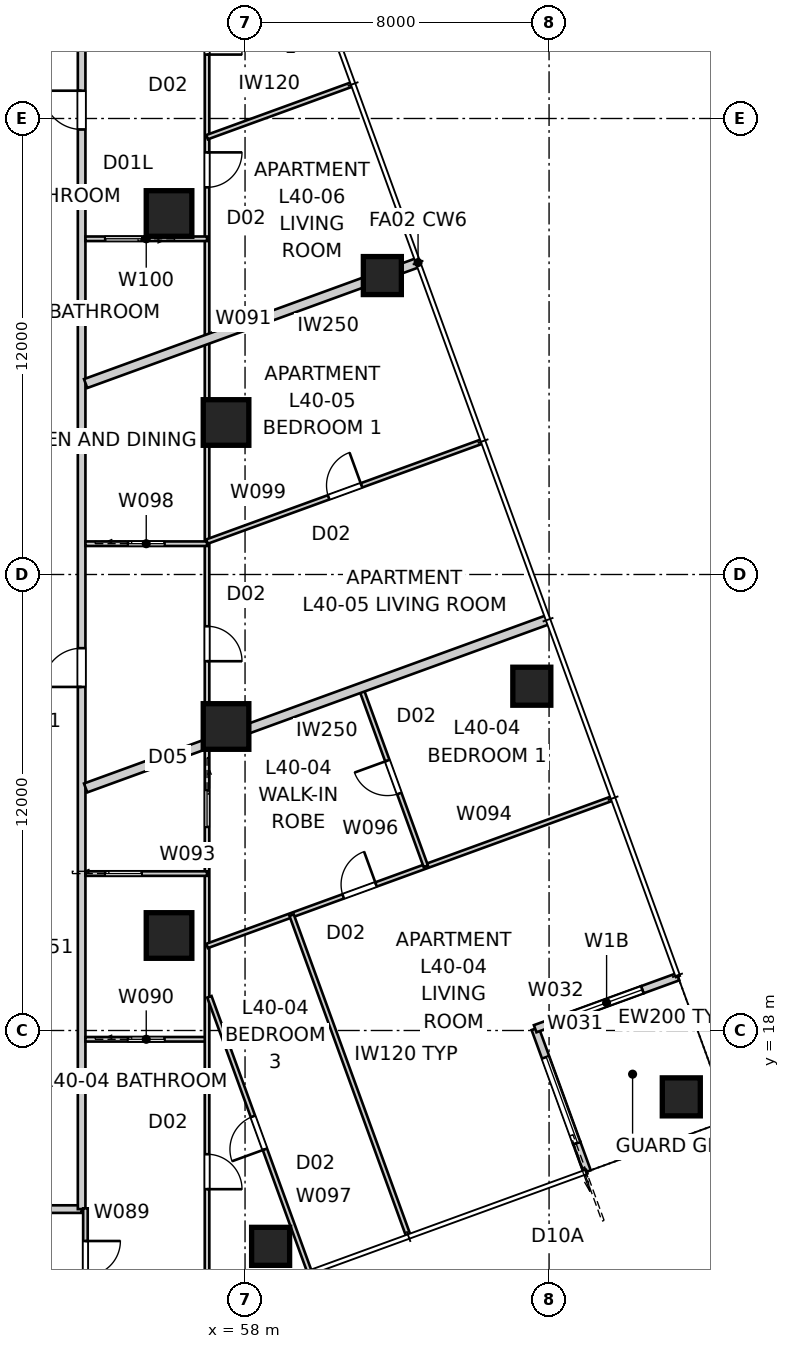
"""IFC4 building model, lengths in metres.
Left out: names, types, materials, properties, quantities, classifications, styles, units other than length and angle.
Written with IfcOpenShell. Run it as: python <this file> out.ifc"""

import sys

from ifc_helpers import new_model, si_unit, direction, frame, frame_2d, origin, origin_2d, place, context, subcontext, project, spatial, rectangle, extrude, element, fill, save


model = new_model("IFC4")
c1 = context("Model", 3, precision=1e-05, world=origin(), true_north=direction((0.0, 1.0)))
c2 = subcontext(c1, "Body", "Model", "MODEL_VIEW")
j1 = project(units=[si_unit("LENGTHUNIT", "METRE"), si_unit("PLANEANGLEUNIT", "RADIAN")], contexts=[c1])
p1 = place(None, origin())
s1 = spatial("IfcSite", under=j1, at=p1, CompositionType="ELEMENT")
p2 = place(p1, origin())
s2 = spatial("IfcBuilding", under=s1, at=p2, CompositionType="ELEMENT")
p3 = place(p2, frame((0.0, 0.0, 147.2)))
s3 = spatial("IfcBuildingStorey", under=s2, at=p3, CompositionType="ELEMENT", Elevation=147.2)
for number, where, z_axis, x_axis in (
    (1, (58.673, 12.32, 0.0), (0.0, 0.0, 1.0), (1.0, 0.0, 0.0)),
    (2, (69.479, 16.253, 0.0), (0.0, 0.0, 1.0), (1.0, 0.0, 0.0)),
    (3, (65.546, 27.06, 0.0), (0.0, 0.0, 1.0), (1.0, 0.0, 0.0)),
    (4, (61.613, 37.866, 0.0), (0.0, 0.0, 1.0), (1.0, 0.0, 0.0)),
):
    element("IfcColumn", number, at=place(p3, frame(where, z_axis=z_axis, x_axis=x_axis)), inside=s3, PredefinedType="COLUMN", context=c2, shape_type="SweptSolid", body=[
        extrude(rectangle(XDim=1.0, YDim=1.0, at=origin_2d()), origin(), (0.0, 0.0, 1.0), 3.4),
    ])
for number, where, z_axis, x_axis in (
    (5, (57.5, 26.0, 0.0), (0.0, 0.0, 1.0), (1.0, 0.0, 0.0)),
    (6, (57.5, 34.0, 0.0), (0.0, 0.0, 1.0), (1.0, 0.0, 0.0)),
    (7, (56.0, 39.5, 0.0), (0.0, 0.0, 1.0), (1.0, 0.0, 0.0)),
    (8, (56.0, 20.5, 0.0), (0.0, 0.0, 1.0), (1.0, 0.0, 0.0)),
):
    element("IfcColumn", number, at=place(p3, frame(where, z_axis=z_axis, x_axis=x_axis)), inside=s3, PredefinedType="COLUMN", context=c2, shape_type="SweptSolid", body=[
        extrude(rectangle(XDim=1.2, YDim=1.2, at=origin_2d()), origin(), (0.0, 0.0, 1.0), 3.4),
    ])
p4 = place(p3, frame((67.002, 14.288, 0.0), z_axis=(0.0, 0.0, 1.0), x_axis=(-0.342110593602, 0.939659694648, 0.0)))
e9 = element("IfcWall", 9, at=p4, inside=s3, PredefinedType="SOLIDWALL", context=c2, shape_type="SweptSolid", body=[
    extrude(rectangle(XDim=0.8, YDim=0.2, at=frame_2d((0.4, 0.0))), origin(), (0.0, 0.0, 1.0), 3.25),
])
p5 = place(p3, frame((66.729, 15.04, 0.0), z_axis=(0.0, 0.0, 1.0), x_axis=(-0.342018703306, 0.939693144909, 0.0)))
e10 = element("IfcWall", 10, at=p5, inside=s3, PredefinedType="SOLIDWALL", context=c2, shape_type="SweptSolid", body=[
    extrude(rectangle(XDim=3.2, YDim=0.2, at=frame_2d((1.6, 0.0))), origin(), (0.0, 0.0, 1.0), 2.722),
])
p6 = place(p5, origin())
e11 = element("IfcOpeningElement", 11, at=p6, cuts=e10, PredefinedType="OPENING", context=c2, shape_type="SweptSolid", body=[
    extrude(rectangle(XDim=2.4, YDim=2.1, at=frame_2d((1.2, 1.05))), frame((0.0, 0.11, 0.0), z_axis=(0.0, -1.0, 0.0), x_axis=(1.0, 0.0, 0.0)), (0.0, 0.0, 1.0), 0.22),
])
p7 = place(p3, frame((65.634, 18.047, 0.0), z_axis=(0.0, 0.0, 1.0), x_axis=(0.939712609717, 0.341965219194, 0.0)))
e12 = element("IfcWall", 12, at=p7, inside=s3, PredefinedType="SOLIDWALL", context=c2, shape_type="SweptSolid", body=[
    extrude(rectangle(XDim=3.0, YDim=0.2, at=frame_2d((1.5, 0.0))), origin(), (0.0, 0.0, 1.0), 2.722),
])
p8 = place(p7, frame((1.0, 0.0, 0.45)))
e13 = element("IfcOpeningElement", 13, at=p8, cuts=e12, PredefinedType="OPENING", context=c2, shape_type="SweptSolid", body=[
    extrude(rectangle(XDim=2.0, YDim=1.8, at=frame_2d((1.0, 0.9))), frame((0.0, 0.11, 0.0), z_axis=(0.0, -1.0, 0.0), x_axis=(1.0, 0.0, 0.0)), (0.0, 0.0, 1.0), 0.22),
])
p9 = place(p3, frame((68.453, 19.073, 0.0), z_axis=(0.0, 0.0, 1.0), x_axis=(0.939686455819, 0.342037080957, 0.0)))
e14 = element("IfcWall", 14, at=p9, inside=s3, PredefinedType="SOLIDWALL", context=c2, shape_type="SweptSolid", body=[
    extrude(rectangle(XDim=1.0, YDim=0.2, at=frame_2d((0.5, 0.0))), origin(), (0.0, 0.0, 1.0), 3.25),
])
p10 = place(p3, frame((47.775, 13.3, 0.0), z_axis=(0.0, 0.0, 1.0), x_axis=(1.0, 0.0, 0.0)))
e15 = element("IfcWall", 15, at=p10, inside=s3, PredefinedType="PARTITIONING", context=c2, shape_type="SweptSolid", body=[
    extrude(rectangle(XDim=5.925, YDim=0.2, at=frame_2d((2.962, 0.0))), origin(), (0.0, 0.0, 1.0), 3.25),
])
p11 = place(p10, frame((2.453, 0.0, 0.0)))
e16 = element("IfcOpeningElement", 16, at=p11, cuts=e15, PredefinedType="OPENING", context=c2, shape_type="SweptSolid", body=[
    extrude(rectangle(XDim=1.02, YDim=2.34, at=frame_2d((0.51, 1.17))), frame((0.0, 0.11, 0.0), z_axis=(0.0, -1.0, 0.0), x_axis=(1.0, 0.0, 0.0)), (0.0, 0.0, 1.0), 0.22),
])
p12 = place(p3, frame((53.7, 13.3, 0.0), z_axis=(0.0, 0.0, 1.0), x_axis=(0.0, 1.0, 0.0)))
e17 = element("IfcWall", 17, at=p12, inside=s3, PredefinedType="PARTITIONING", context=c2, shape_type="SweptSolid", body=[
    extrude(rectangle(XDim=33.0, YDim=0.2, at=frame_2d((16.5, 0.0))), origin(), (0.0, 0.0, 1.0), 3.25),
])
p13 = place(p12, frame((28.411, 0.0, 0.0)))
e18 = element("IfcOpeningElement", 18, at=p13, cuts=e17, PredefinedType="OPENING", context=c2, shape_type="SweptSolid", body=[
    extrude(rectangle(XDim=1.02, YDim=2.1, at=frame_2d((0.51, 1.05))), frame((0.0, 0.11, 0.0), z_axis=(0.0, -1.0, 0.0), x_axis=(1.0, 0.0, 0.0)), (0.0, 0.0, 1.0), 0.22),
])
p14 = place(p12, frame((13.741, 0.0, 0.0)))
e19 = element("IfcOpeningElement", 19, at=p14, cuts=e17, PredefinedType="OPENING", context=c2, shape_type="SweptSolid", body=[
    extrude(rectangle(XDim=1.02, YDim=2.34, at=frame_2d((0.51, 1.17))), frame((0.0, 0.11, 0.0), z_axis=(0.0, -1.0, 0.0), x_axis=(1.0, 0.0, 0.0)), (0.0, 0.0, 1.0), 0.22),
])
p15 = place(p3, frame((62.553, 38.208, 0.0), z_axis=(0.0, 0.0, 1.0), x_axis=(-0.939693071685, -0.342018904489, 0.0)))
e20 = element("IfcWall", 20, at=p15, inside=s3, PredefinedType="PARTITIONING", context=c2, shape_type="SweptSolid", body=[
    extrude(rectangle(XDim=9.309, YDim=0.25, at=frame_2d((4.654, 0.0))), origin(), (0.0, 0.0, 1.0), 3.25),
])
p16 = place(p3, frame((65.973, 28.812, 0.0), z_axis=(0.0, 0.0, 1.0), x_axis=(-0.939692090592, -0.342021600019, 0.0)))
e21 = element("IfcWall", 21, at=p16, inside=s3, PredefinedType="PARTITIONING", context=c2, shape_type="SweptSolid", body=[
    extrude(rectangle(XDim=12.949, YDim=0.25, at=frame_2d((6.474, 0.0))), origin(), (0.0, 0.0, 1.0), 3.25),
])
p17 = place(p3, frame((53.8, 13.32, 0.0), z_axis=(0.0, 0.0, 1.0), x_axis=(0.0, -1.0, 0.0)))
e22 = element("IfcWall", 22, at=p17, inside=s3, PredefinedType="PARTITIONING", context=c2, shape_type="SweptSolid", body=[
    extrude(rectangle(XDim=2.52, YDim=0.12, at=frame_2d((1.26, 0.0))), origin(), (0.0, 0.0, 1.0), 3.25),
])
p18 = place(p17, frame((0.86, 0.0, 0.0)))
e23 = element("IfcOpeningElement", 23, at=p18, cuts=e22, PredefinedType="OPENING", context=c2, shape_type="SweptSolid", body=[
    extrude(rectangle(XDim=0.92, YDim=2.34, at=frame_2d((0.46, 1.17))), frame((0.0, 0.07, 0.0), z_axis=(0.0, -1.0, 0.0), x_axis=(1.0, 0.0, 0.0)), (0.0, 0.0, 1.0), 0.14),
])
p19 = place(p3, frame((53.8, 17.769, 0.0), z_axis=(0.0, 0.0, 1.0), x_axis=(1.0, 0.0, 0.0)))
e24 = element("IfcWall", 24, at=p19, inside=s3, PredefinedType="PARTITIONING", context=c2, shape_type="SweptSolid", body=[
    extrude(rectangle(XDim=3.2, YDim=0.12, at=frame_2d((1.6, 0.0))), origin(), (0.0, 0.0, 1.0), 3.25),
])
p20 = place(p19, frame((1.12, 0.0, 0.0)))
e25 = element("IfcOpeningElement", 25, at=p20, cuts=e24, PredefinedType="OPENING", context=c2, shape_type="SweptSolid", body=[
    extrude(rectangle(XDim=0.96, YDim=2.1, at=frame_2d((0.48, 1.05))), frame((0.0, 0.07, 0.0), z_axis=(0.0, -1.0, 0.0), x_axis=(1.0, 0.0, 0.0)), (0.0, 0.0, 1.0), 0.14),
])
p21 = place(p3, frame((57.0, 48.8, 0.0), z_axis=(0.0, 0.0, 1.0), x_axis=(0.0, -1.0, 0.0)))
e26 = element("IfcWall", 26, at=p21, inside=s3, PredefinedType="PARTITIONING", context=c2, shape_type="SweptSolid", body=[
    extrude(rectangle(XDim=38.113, YDim=0.12, at=frame_2d((19.056, 0.0))), origin(), (0.0, 0.0, 1.0), 2.55),
])
p22 = place(p21, frame((4.198, 0.0, 0.0)))
e27 = element("IfcOpeningElement", 27, at=p22, cuts=e26, PredefinedType="OPENING", context=c2, shape_type="SweptSolid", body=[
    extrude(rectangle(XDim=0.92, YDim=2.34, at=frame_2d((0.46, 1.17))), frame((0.0, 0.07, 0.0), z_axis=(0.0, -1.0, 0.0), x_axis=(1.0, 0.0, 0.0)), (0.0, 0.0, 1.0), 0.14),
])
p23 = place(p21, frame((7.692, 0.0, 0.0)))
e28 = element("IfcOpeningElement", 28, at=p23, cuts=e26, PredefinedType="OPENING", context=c2, shape_type="SweptSolid", body=[
    extrude(rectangle(XDim=0.92, YDim=2.34, at=frame_2d((0.46, 1.17))), frame((0.0, 0.07, 0.0), z_axis=(0.0, -1.0, 0.0), x_axis=(1.0, 0.0, 0.0)), (0.0, 0.0, 1.0), 0.14),
])
p24 = place(p21, frame((20.162, 0.0, 0.0)))
e29 = element("IfcOpeningElement", 29, at=p24, cuts=e26, PredefinedType="OPENING", context=c2, shape_type="SweptSolid", body=[
    extrude(rectangle(XDim=0.92, YDim=2.34, at=frame_2d((0.46, 1.17))), frame((0.0, 0.07, 0.0), z_axis=(0.0, -1.0, 0.0), x_axis=(1.0, 0.0, 0.0)), (0.0, 0.0, 1.0), 0.14),
])
p25 = place(p21, frame((34.056, 0.0, 0.0)))
e30 = element("IfcOpeningElement", 30, at=p25, cuts=e26, PredefinedType="OPENING", context=c2, shape_type="SweptSolid", body=[
    extrude(rectangle(XDim=0.92, YDim=2.34, at=frame_2d((0.46, 1.17))), frame((0.0, 0.07, 0.0), z_axis=(0.0, -1.0, 0.0), x_axis=(1.0, 0.0, 0.0)), (0.0, 0.0, 1.0), 0.14),
])
p26 = place(p21, frame((24.482, 0.0, 0.0)))
e31 = element("IfcOpeningElement", 31, at=p26, cuts=e26, PredefinedType="OPENING", context=c2, shape_type="SweptSolid", body=[
    extrude(rectangle(XDim=0.96, YDim=2.1, at=frame_2d((0.48, 1.05))), frame((0.0, 0.07, 0.0), z_axis=(0.0, -1.0, 0.0), x_axis=(1.0, 0.0, 0.0)), (0.0, 0.0, 1.0), 0.14),
])
p27 = place(p3, frame((53.8, 22.129, 0.0), z_axis=(0.0, 0.0, 1.0), x_axis=(1.0, 0.0, 0.0)))
e32 = element("IfcWall", 32, at=p27, inside=s3, PredefinedType="PARTITIONING", context=c2, shape_type="SweptSolid", body=[
    extrude(rectangle(XDim=3.2, YDim=0.12, at=frame_2d((1.6, 0.0))), origin(), (0.0, 0.0, 1.0), 3.25),
])
p28 = place(p27, frame((0.52, 0.0, 0.0)))
e33 = element("IfcOpeningElement", 33, at=p28, cuts=e32, PredefinedType="OPENING", context=c2, shape_type="SweptSolid", body=[
    extrude(rectangle(XDim=0.96, YDim=2.1, at=frame_2d((0.48, 1.05))), frame((0.0, 0.07, 0.0), z_axis=(0.0, -1.0, 0.0), x_axis=(1.0, 0.0, 0.0)), (0.0, 0.0, 1.0), 0.14),
])
p29 = place(p3, frame((57.0, 20.225, 0.0), z_axis=(0.0, 0.0, 1.0), x_axis=(0.939693965364, 0.342016449105, 0.0)))
e34 = element("IfcWall", 34, at=p29, inside=s3, PredefinedType="PARTITIONING", context=c2, shape_type="SweptSolid", body=[
    extrude(rectangle(XDim=11.328, YDim=0.12, at=frame_2d((5.664, 0.0))), origin(), (0.0, 0.0, 1.0), 3.25),
])
p30 = place(p29, frame((3.812, 0.0, 0.0)))
e35 = element("IfcOpeningElement", 35, at=p30, cuts=e34, PredefinedType="OPENING", context=c2, shape_type="SweptSolid", body=[
    extrude(rectangle(XDim=0.92, YDim=2.34, at=frame_2d((0.46, 1.17))), frame((0.0, 0.07, 0.0), z_axis=(0.0, -1.0, 0.0), x_axis=(1.0, 0.0, 0.0)), (0.0, 0.0, 1.0), 0.14),
])
p31 = place(p3, frame((62.29, 12.615, 0.0), z_axis=(0.0, 0.0, 1.0), x_axis=(-0.342038393654, 0.939685978009, 0.0)))
e36 = element("IfcWall", 36, at=p31, inside=s3, PredefinedType="PARTITIONING", context=c2, shape_type="SweptSolid", body=[
    extrude(rectangle(XDim=8.96, YDim=0.12, at=frame_2d((4.48, 0.0))), origin(), (0.0, 0.0, 1.0), 3.25),
])
p32 = place(p3, frame((62.757, 22.32, 0.0), z_axis=(0.0, 0.0, 1.0), x_axis=(-0.341993964619, 0.939702148643, 0.0)))
e37 = element("IfcWall", 37, at=p32, inside=s3, PredefinedType="PARTITIONING", context=c2, shape_type="SweptSolid", body=[
    extrude(rectangle(XDim=5.0, YDim=0.12, at=frame_2d((2.5, 0.0))), origin(), (0.0, 0.0, 1.0), 3.25),
])
p33 = place(p32, frame((2.04, 0.0, 0.0)))
e38 = element("IfcOpeningElement", 38, at=p33, cuts=e37, PredefinedType="OPENING", context=c2, shape_type="SweptSolid", body=[
    extrude(rectangle(XDim=0.92, YDim=2.34, at=frame_2d((0.46, 1.17))), frame((0.0, 0.07, 0.0), z_axis=(0.0, -1.0, 0.0), x_axis=(1.0, 0.0, 0.0)), (0.0, 0.0, 1.0), 0.14),
])
p34 = place(p3, frame((59.689, 11.669, 0.0), z_axis=(0.0, 0.0, 1.0), x_axis=(-0.342003311293, 0.939698746974, 0.0)))
e39 = element("IfcWall", 39, at=p34, inside=s3, PredefinedType="PARTITIONING", context=c2, shape_type="SweptSolid", body=[
    extrude(rectangle(XDim=7.683, YDim=0.12, at=frame_2d((3.841, 0.0))), origin(), (0.0, 0.0, 1.0), 3.25),
])
p35 = place(p34, frame((3.411, 0.0, 0.0)))
e40 = element("IfcOpeningElement", 40, at=p35, cuts=e39, PredefinedType="OPENING", context=c2, shape_type="SweptSolid", body=[
    extrude(rectangle(XDim=0.92, YDim=2.34, at=frame_2d((0.46, 1.17))), frame((0.0, 0.07, 0.0), z_axis=(0.0, -1.0, 0.0), x_axis=(1.0, 0.0, 0.0)), (0.0, 0.0, 1.0), 0.14),
])
p36 = place(p3, frame((53.8, 30.81, 0.0), z_axis=(0.0, 0.0, 1.0), x_axis=(1.0, 0.0, 0.0)))
e41 = element("IfcWall", 41, at=p36, inside=s3, PredefinedType="PARTITIONING", context=c2, shape_type="SweptSolid", body=[
    extrude(rectangle(XDim=3.2, YDim=0.12, at=frame_2d((1.6, 0.0))), origin(), (0.0, 0.0, 1.0), 3.25),
])
p37 = place(p36, frame((1.12, 0.0, 0.0)))
e42 = element("IfcOpeningElement", 42, at=p37, cuts=e41, PredefinedType="OPENING", context=c2, shape_type="SweptSolid", body=[
    extrude(rectangle(XDim=0.96, YDim=2.1, at=frame_2d((0.48, 1.05))), frame((0.0, 0.07, 0.0), z_axis=(0.0, -1.0, 0.0), x_axis=(1.0, 0.0, 0.0)), (0.0, 0.0, 1.0), 0.14),
])
p38 = place(p3, frame((57.0, 30.866, 0.0), z_axis=(0.0, 0.0, 1.0), x_axis=(0.939685835373, 0.342038785519, 0.0)))
e43 = element("IfcWall", 43, at=p38, inside=s3, PredefinedType="PARTITIONING", context=c2, shape_type="SweptSolid", body=[
    extrude(rectangle(XDim=7.689, YDim=0.12, at=frame_2d((3.844, 0.0))), origin(), (0.0, 0.0, 1.0), 3.25),
])
p39 = place(p38, frame((3.404, 0.0, 0.0)))
e44 = element("IfcOpeningElement", 44, at=p39, cuts=e43, PredefinedType="OPENING", context=c2, shape_type="SweptSolid", body=[
    extrude(rectangle(XDim=0.92, YDim=2.34, at=frame_2d((0.46, 1.17))), frame((0.0, 0.07, 0.0), z_axis=(0.0, -1.0, 0.0), x_axis=(1.0, 0.0, 0.0)), (0.0, 0.0, 1.0), 0.14),
])
p40 = place(p3, frame((57.0, 38.835, 0.0), z_axis=(0.0, 0.0, 1.0), x_axis=(-1.0, 0.0, 0.0)))
e45 = element("IfcWall", 45, at=p40, inside=s3, PredefinedType="PARTITIONING", context=c2, shape_type="SweptSolid", body=[
    extrude(rectangle(XDim=3.2, YDim=0.12, at=frame_2d((1.6, 0.0))), origin(), (0.0, 0.0, 1.0), 2.796),
])
p41 = place(p40, frame((1.72, 0.0, 0.0)))
e46 = element("IfcOpeningElement", 46, at=p41, cuts=e45, PredefinedType="OPENING", context=c2, shape_type="SweptSolid", body=[
    extrude(rectangle(XDim=0.96, YDim=2.1, at=frame_2d((0.48, 1.05))), frame((0.0, 0.07, 0.0), z_axis=(0.0, -1.0, 0.0), x_axis=(1.0, 0.0, 0.0)), (0.0, 0.0, 1.0), 0.14),
])
p42 = place(p3, frame((57.0, 41.508, 0.0), z_axis=(0.0, 0.0, 1.0), x_axis=(0.939682468191, 0.342048036063, 0.0)))
e47 = element("IfcWall", 47, at=p42, inside=s3, PredefinedType="PARTITIONING", context=c2, shape_type="SweptSolid", body=[
    extrude(rectangle(XDim=4.049, YDim=0.12, at=frame_2d((2.024, 0.0))), origin(), (0.0, 0.0, 1.0), 3.25),
])
p43 = place(p6, origin())
e48 = element("IfcDoor", 48, at=p43, inside=s3, OperationType="SLIDING_TO_LEFT", PredefinedType="DOOR", context=c2, shape_type="SweptSolid", body=[
    extrude(rectangle(XDim=2.4, YDim=2.1, at=frame_2d((1.2, 1.05))), frame((0.0, 0.025, 0.0), z_axis=(0.0, -1.0, 0.0), x_axis=(1.0, 0.0, 0.0)), (0.0, 0.0, 1.0), 0.05),
])
fill(e11, e48)
p44 = place(p8, origin())
e49 = element("IfcWindow", 49, at=p44, inside=s3, PartitioningType="SINGLE_PANEL", PredefinedType="WINDOW", context=c2, shape_type="SweptSolid", body=[
    extrude(rectangle(XDim=2.0, YDim=1.8, at=frame_2d((1.0, 0.9))), frame((0.0, 0.03, 0.0), z_axis=(0.0, -1.0, 0.0), x_axis=(1.0, 0.0, 0.0)), (0.0, 0.0, 1.0), 0.06),
])
fill(e13, e49)
p45 = place(p13, origin())
e50 = element("IfcDoor", 50, at=p45, inside=s3, OperationType="SINGLE_SWING_RIGHT", PredefinedType="DOOR", context=c2, shape_type="SweptSolid", body=[
    extrude(rectangle(XDim=1.02, YDim=2.1, at=frame_2d((0.51, 1.05))), frame((0.0, 0.025, 0.0), z_axis=(0.0, -1.0, 0.0), x_axis=(1.0, 0.0, 0.0)), (0.0, 0.0, 1.0), 0.05),
])
fill(e18, e50)
p46 = place(p14, origin())
e51 = element("IfcDoor", 51, at=p46, inside=s3, OperationType="SINGLE_SWING_LEFT", PredefinedType="DOOR", context=c2, shape_type="SweptSolid", body=[
    extrude(rectangle(XDim=1.02, YDim=2.34, at=frame_2d((0.51, 1.17))), frame((0.0, 0.025, 0.0), z_axis=(0.0, -1.0, 0.0), x_axis=(1.0, 0.0, 0.0)), (0.0, 0.0, 1.0), 0.05),
])
fill(e19, e51)
p47 = place(p18, origin())
e52 = element("IfcDoor", 52, at=p47, inside=s3, OperationType="SINGLE_SWING_LEFT", PredefinedType="DOOR", context=c2, shape_type="SweptSolid", body=[
    extrude(rectangle(XDim=0.92, YDim=2.34, at=frame_2d((0.46, 1.17))), frame((0.0, 0.025, 0.0), z_axis=(0.0, -1.0, 0.0), x_axis=(1.0, 0.0, 0.0)), (0.0, 0.0, 1.0), 0.05),
])
fill(e23, e52)
p48 = place(p22, origin())
e53 = element("IfcDoor", 53, at=p48, inside=s3, OperationType="SINGLE_SWING_RIGHT", PredefinedType="DOOR", context=c2, shape_type="SweptSolid", body=[
    extrude(rectangle(XDim=0.92, YDim=2.34, at=frame_2d((0.46, 1.17))), frame((0.0, 0.025, 0.0), z_axis=(0.0, -1.0, 0.0), x_axis=(1.0, 0.0, 0.0)), (0.0, 0.0, 1.0), 0.05),
])
fill(e27, e53)
p49 = place(p41, origin())
e54 = element("IfcDoor", 54, at=p49, inside=s3, OperationType="SLIDING_TO_LEFT", PredefinedType="DOOR", context=c2, shape_type="SweptSolid", body=[
    extrude(rectangle(XDim=0.96, YDim=2.1, at=frame_2d((0.48, 1.05))), frame((0.0, 0.025, 0.0), z_axis=(0.0, -1.0, 0.0), x_axis=(1.0, 0.0, 0.0)), (0.0, 0.0, 1.0), 0.05),
])
fill(e46, e54)
p50 = place(p23, origin())
e55 = element("IfcDoor", 55, at=p50, inside=s3, OperationType="SINGLE_SWING_LEFT", PredefinedType="DOOR", context=c2, shape_type="SweptSolid", body=[
    extrude(rectangle(XDim=0.92, YDim=2.34, at=frame_2d((0.46, 1.17))), frame((0.0, 0.025, 0.0), z_axis=(0.0, -1.0, 0.0), x_axis=(1.0, 0.0, 0.0)), (0.0, 0.0, 1.0), 0.05),
])
fill(e28, e55)
p51 = place(p24, origin())
e56 = element("IfcDoor", 56, at=p51, inside=s3, OperationType="SINGLE_SWING_RIGHT", PredefinedType="DOOR", context=c2, shape_type="SweptSolid", body=[
    extrude(rectangle(XDim=0.92, YDim=2.34, at=frame_2d((0.46, 1.17))), frame((0.0, 0.025, 0.0), z_axis=(0.0, -1.0, 0.0), x_axis=(1.0, 0.0, 0.0)), (0.0, 0.0, 1.0), 0.05),
])
fill(e29, e56)
p52 = place(p37, origin())
e57 = element("IfcDoor", 57, at=p52, inside=s3, OperationType="SLIDING_TO_LEFT", PredefinedType="DOOR", context=c2, shape_type="SweptSolid", body=[
    extrude(rectangle(XDim=0.96, YDim=2.1, at=frame_2d((0.48, 1.05))), frame((0.0, 0.025, 0.0), z_axis=(0.0, -1.0, 0.0), x_axis=(1.0, 0.0, 0.0)), (0.0, 0.0, 1.0), 0.05),
])
fill(e42, e57)
p53 = place(p25, origin())
e58 = element("IfcDoor", 58, at=p53, inside=s3, OperationType="SINGLE_SWING_RIGHT", PredefinedType="DOOR", context=c2, shape_type="SweptSolid", body=[
    extrude(rectangle(XDim=0.92, YDim=2.34, at=frame_2d((0.46, 1.17))), frame((0.0, 0.025, 0.0), z_axis=(0.0, -1.0, 0.0), x_axis=(1.0, 0.0, 0.0)), (0.0, 0.0, 1.0), 0.05),
])
fill(e30, e58)
p54 = place(p20, origin())
e59 = element("IfcDoor", 59, at=p54, inside=s3, OperationType="SLIDING_TO_LEFT", PredefinedType="DOOR", context=c2, shape_type="SweptSolid", body=[
    extrude(rectangle(XDim=0.96, YDim=2.1, at=frame_2d((0.48, 1.05))), frame((0.0, 0.025, 0.0), z_axis=(0.0, -1.0, 0.0), x_axis=(1.0, 0.0, 0.0)), (0.0, 0.0, 1.0), 0.05),
])
fill(e25, e59)
p55 = place(p39, origin())
e60 = element("IfcDoor", 60, at=p55, inside=s3, OperationType="SINGLE_SWING_RIGHT", PredefinedType="DOOR", context=c2, shape_type="SweptSolid", body=[
    extrude(rectangle(XDim=0.92, YDim=2.34, at=frame_2d((0.46, 1.17))), frame((0.0, 0.025, 0.0), z_axis=(0.0, -1.0, 0.0), x_axis=(1.0, 0.0, 0.0)), (0.0, 0.0, 1.0), 0.05),
])
fill(e44, e60)
p56 = place(p35, origin())
e61 = element("IfcDoor", 61, at=p56, inside=s3, OperationType="SINGLE_SWING_LEFT", PredefinedType="DOOR", context=c2, shape_type="SweptSolid", body=[
    extrude(rectangle(XDim=0.92, YDim=2.34, at=frame_2d((0.46, 1.17))), frame((0.0, 0.025, 0.0), z_axis=(0.0, -1.0, 0.0), x_axis=(1.0, 0.0, 0.0)), (0.0, 0.0, 1.0), 0.05),
])
fill(e40, e61)
p57 = place(p28, origin())
e62 = element("IfcDoor", 62, at=p57, inside=s3, OperationType="SLIDING_TO_LEFT", PredefinedType="DOOR", context=c2, shape_type="SweptSolid", body=[
    extrude(rectangle(XDim=0.96, YDim=2.1, at=frame_2d((0.48, 1.05))), frame((0.0, 0.025, 0.0), z_axis=(0.0, -1.0, 0.0), x_axis=(1.0, 0.0, 0.0)), (0.0, 0.0, 1.0), 0.05),
])
fill(e33, e62)
p58 = place(p26, origin())
e63 = element("IfcDoor", 63, at=p58, inside=s3, OperationType="SLIDING_TO_LEFT", PredefinedType="DOOR", context=c2, shape_type="SweptSolid", body=[
    extrude(rectangle(XDim=0.96, YDim=2.1, at=frame_2d((0.48, 1.05))), frame((0.0, 0.025, 0.0), z_axis=(0.0, -1.0, 0.0), x_axis=(1.0, 0.0, 0.0)), (0.0, 0.0, 1.0), 0.05),
])
fill(e31, e63)
p59 = place(p33, origin())
e64 = element("IfcDoor", 64, at=p59, inside=s3, OperationType="SINGLE_SWING_RIGHT", PredefinedType="DOOR", context=c2, shape_type="SweptSolid", body=[
    extrude(rectangle(XDim=0.92, YDim=2.34, at=frame_2d((0.46, 1.17))), frame((0.0, 0.025, 0.0), z_axis=(0.0, -1.0, 0.0), x_axis=(1.0, 0.0, 0.0)), (0.0, 0.0, 1.0), 0.05),
])
fill(e38, e64)
p60 = place(p30, origin())
e65 = element("IfcDoor", 65, at=p60, inside=s3, OperationType="SINGLE_SWING_RIGHT", PredefinedType="DOOR", context=c2, shape_type="SweptSolid", body=[
    extrude(rectangle(XDim=0.92, YDim=2.34, at=frame_2d((0.46, 1.17))), frame((0.0, 0.025, 0.0), z_axis=(0.0, -1.0, 0.0), x_axis=(1.0, 0.0, 0.0)), (0.0, 0.0, 1.0), 0.05),
])
fill(e35, e65)
save(model, sys.argv[1])
